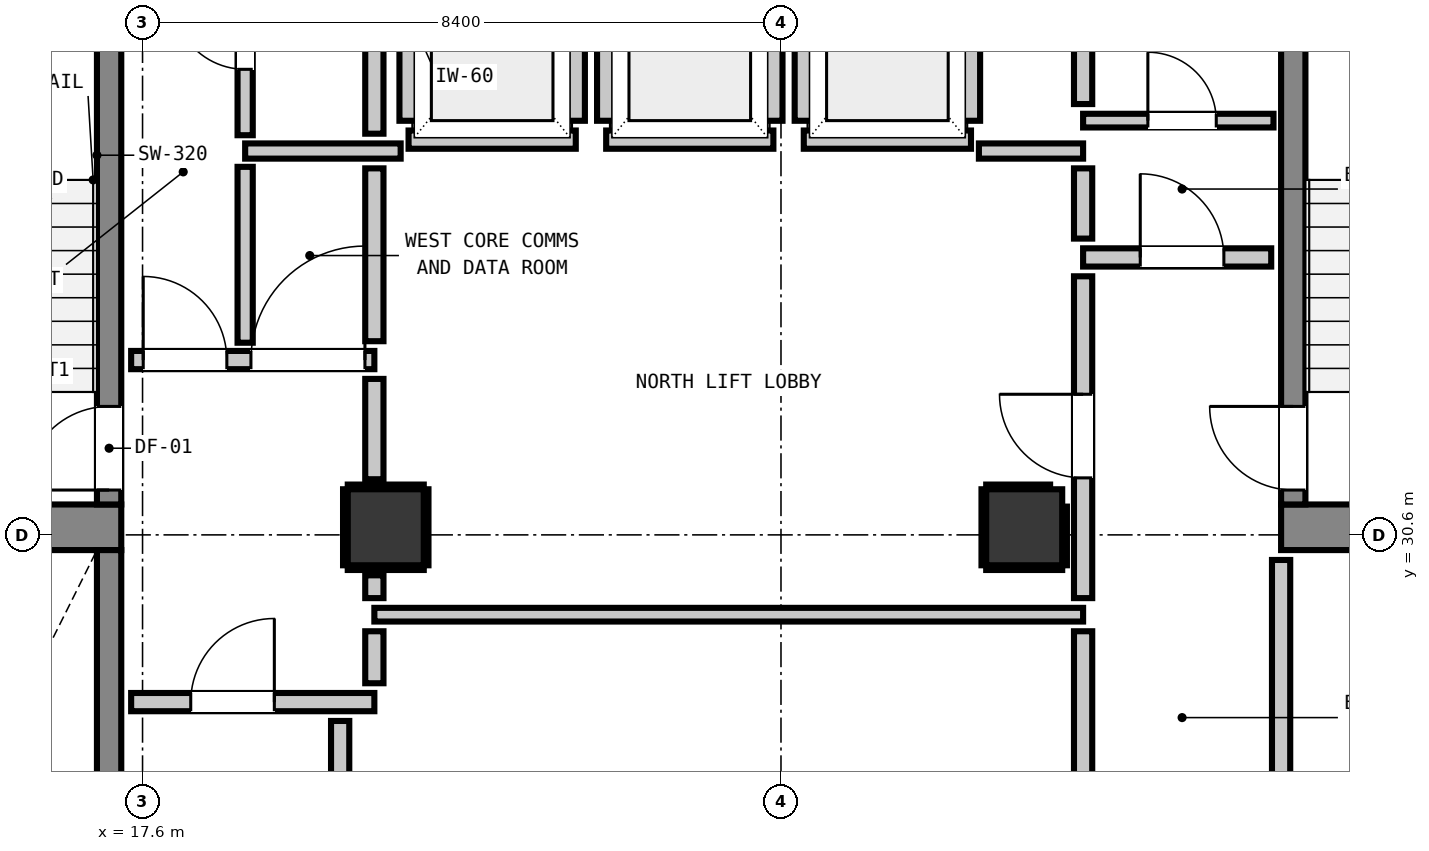
"""IFC4 building model, lengths in metres.
Left out: names, types, materials, properties, quantities, classifications, styles, units other than length and angle.
Written with IfcOpenShell. Run it as: python <this file> out.ifc"""

import sys

from ifc_helpers import new_model, si_unit, direction, frame, frame_2d, origin, origin_2d, place, context, subcontext, project, spatial, rectangle, extrude, element, fill, save


model = new_model("IFC4")
c1 = context("Model", 3, precision=1e-05, world=origin(), true_north=direction((0.0, 1.0)))
c2 = subcontext(c1, "Body", "Model", "MODEL_VIEW")
j1 = project(units=[si_unit("LENGTHUNIT", "METRE"), si_unit("PLANEANGLEUNIT", "RADIAN")], contexts=[c1])
p1 = place(None, origin())
s1 = spatial("IfcSite", under=j1, at=p1, CompositionType="ELEMENT")
p2 = place(p1, origin())
s2 = spatial("IfcBuilding", under=s1, at=p2, CompositionType="ELEMENT")
p3 = place(p2, frame((0.0, 0.0, 65.16)))
s3 = spatial("IfcBuildingStorey", under=s2, at=p3, CompositionType="ELEMENT", Elevation=65.16)
for number, where, z_axis, x_axis in (
    (1, (13.905, 30.7, 0.0), (0.0, 0.0, 1.0), (1.0, 0.0, 0.0)),
    (2, (32.58, 30.7, 0.0), (0.0, 0.0, 1.0), (1.0, 0.0, 0.0)),
):
    element("IfcWall", number, at=place(p3, frame(where, z_axis=z_axis, x_axis=x_axis)), inside=s3, PredefinedType="SHEAR", context=c2, shape_type="SweptSolid", body=[
        extrude(rectangle(XDim=3.415, YDim=0.6, at=frame_2d((1.708, 0.0))), origin(), (0.0, 0.0, 1.0), 3.32),
    ])
p4 = place(p3, frame((17.16, 31.0, 0.0), z_axis=(0.0, 0.0, 1.0), x_axis=(0.0, 1.0, 0.0)))
e3 = element("IfcWall", 3, at=p4, inside=s3, PredefinedType="SHEAR", context=c2, shape_type="SweptSolid", body=[
    extrude(rectangle(XDim=7.8, YDim=0.32, at=frame_2d((3.9, 0.0))), origin(), (0.0, 0.0, 1.0), 3.32),
])
p5 = place(p4, frame((0.19, 0.0, 0.0)))
e4 = element("IfcOpeningElement", 4, at=p5, cuts=e3, PredefinedType="OPENING", context=c2, shape_type="SweptSolid", body=[
    extrude(rectangle(XDim=1.1, YDim=2.15, at=frame_2d((0.55, 1.075))), frame((0.0, 0.17, 0.0), z_axis=(0.0, -1.0, 0.0), x_axis=(1.0, 0.0, 0.0)), (0.0, 0.0, 1.0), 0.34),
])
p6 = place(p3, frame((17.16, 22.6, 0.0), z_axis=(0.0, 0.0, 1.0), x_axis=(0.0, 1.0, 0.0)))
e5 = element("IfcWall", 5, at=p6, inside=s3, PredefinedType="SHEAR", context=c2, shape_type="SweptSolid", body=[
    extrude(rectangle(XDim=7.8, YDim=0.32, at=frame_2d((3.9, 0.0))), origin(), (0.0, 0.0, 1.0), 3.32),
])
p7 = place(p6, frame((0.19, 0.0, 0.0)))
e6 = element("IfcOpeningElement", 6, at=p7, cuts=e5, PredefinedType="OPENING", context=c2, shape_type="SweptSolid", body=[
    extrude(rectangle(XDim=1.1, YDim=2.15, at=frame_2d((0.55, 1.075))), frame((0.0, 0.17, 0.0), z_axis=(0.0, -1.0, 0.0), x_axis=(1.0, 0.0, 0.0)), (0.0, 0.0, 1.0), 0.34),
])
p8 = place(p3, frame((32.74, 31.0, 0.0), z_axis=(0.0, 0.0, 1.0), x_axis=(0.0, 1.0, 0.0)))
e7 = element("IfcWall", 7, at=p8, inside=s3, PredefinedType="SHEAR", context=c2, shape_type="SweptSolid", body=[
    extrude(rectangle(XDim=7.8, YDim=0.32, at=frame_2d((3.9, 0.0))), origin(), (0.0, 0.0, 1.0), 3.32),
])
p9 = place(p8, frame((0.19, 0.0, 0.0)))
e8 = element("IfcOpeningElement", 8, at=p9, cuts=e7, PredefinedType="OPENING", context=c2, shape_type="SweptSolid", body=[
    extrude(rectangle(XDim=1.1, YDim=2.15, at=frame_2d((0.55, 1.075))), frame((0.0, 0.17, 0.0), z_axis=(0.0, -1.0, 0.0), x_axis=(1.0, 0.0, 0.0)), (0.0, 0.0, 1.0), 0.34),
])
for number, where, z_axis, x_axis in (
    (9, (20.8, 30.7, 0.0), (0.0, 0.0, 1.0), (1.0, 0.0, 0.0)),
    (10, (29.2, 30.7, 0.0), (0.0, 0.0, 1.0), (1.0, 0.0, 0.0)),
):
    element("IfcColumn", number, at=place(p3, frame(where, z_axis=z_axis, x_axis=x_axis)), inside=s3, PredefinedType="COLUMN", context=c2, shape_type="SweptSolid", body=[
        extrude(rectangle(XDim=1.0, YDim=1.0, at=origin_2d()), origin(), (0.0, 0.0, 1.0), 3.32),
    ])
p10 = place(p3, frame((21.1, 35.8, 0.0), z_axis=(0.0, 0.0, 1.0), x_axis=(1.0, 0.0, 0.0)))
e11 = element("IfcWall", 11, at=p10, inside=s3, PredefinedType="PARTITIONING", context=c2, shape_type="SweptSolid", body=[
    extrude(rectangle(XDim=2.2, YDim=0.24, at=frame_2d((1.1, 0.0))), origin(), (0.0, 0.0, 1.0), 3.06),
])
p11 = place(p3, frame((21.1, 36.048, 0.0), z_axis=(0.0, 0.0, 1.0), x_axis=(0.0, 1.0, 0.0)))
e12 = element("IfcWall", 12, at=p11, inside=s3, PredefinedType="PARTITIONING", context=c2, shape_type="SweptSolid", body=[
    extrude(rectangle(XDim=2.104, YDim=0.24, at=frame_2d((1.052, 0.0))), origin(), (0.0, 0.0, 1.0), 2.295),
])
p12 = place(p3, frame((23.3, 36.048, 0.0), z_axis=(0.0, 0.0, 1.0), x_axis=(0.0, 1.0, 0.0)))
e13 = element("IfcWall", 13, at=p12, inside=s3, PredefinedType="PARTITIONING", context=c2, shape_type="SweptSolid", body=[
    extrude(rectangle(XDim=2.104, YDim=0.24, at=frame_2d((1.052, 0.0))), origin(), (0.0, 0.0, 1.0), 3.06),
])
p13 = place(p3, frame((23.7, 35.8, 0.0), z_axis=(0.0, 0.0, 1.0), x_axis=(1.0, 0.0, 0.0)))
e14 = element("IfcWall", 14, at=p13, inside=s3, PredefinedType="PARTITIONING", context=c2, shape_type="SweptSolid", body=[
    extrude(rectangle(XDim=2.2, YDim=0.24, at=frame_2d((1.1, 0.0))), origin(), (0.0, 0.0, 1.0), 3.06),
])
for number, where, z_axis, x_axis in (
    (15, (23.7, 36.048, 0.0), (0.0, 0.0, 1.0), (0.0, 1.0, 0.0)),
    (16, (25.9, 36.048, 0.0), (0.0, 0.0, 1.0), (0.0, 1.0, 0.0)),
):
    element("IfcWall", number, at=place(p3, frame(where, z_axis=z_axis, x_axis=x_axis)), inside=s3, PredefinedType="PARTITIONING", context=c2, shape_type="SweptSolid", body=[
        extrude(rectangle(XDim=2.104, YDim=0.24, at=frame_2d((1.052, 0.0))), origin(), (0.0, 0.0, 1.0), 3.06),
    ])
p14 = place(p3, frame((26.3, 35.8, 0.0), z_axis=(0.0, 0.0, 1.0), x_axis=(1.0, 0.0, 0.0)))
e17 = element("IfcWall", 17, at=p14, inside=s3, PredefinedType="PARTITIONING", context=c2, shape_type="SweptSolid", body=[
    extrude(rectangle(XDim=2.2, YDim=0.24, at=frame_2d((1.1, 0.0))), origin(), (0.0, 0.0, 1.0), 3.06),
])
for number, where, z_axis, x_axis in (
    (18, (26.3, 36.048, 0.0), (0.0, 0.0, 1.0), (0.0, 1.0, 0.0)),
    (19, (28.5, 36.048, 0.0), (0.0, 0.0, 1.0), (0.0, 1.0, 0.0)),
):
    element("IfcWall", number, at=place(p3, frame(where, z_axis=z_axis, x_axis=x_axis)), inside=s3, PredefinedType="PARTITIONING", context=c2, shape_type="SweptSolid", body=[
        extrude(rectangle(XDim=2.104, YDim=0.24, at=frame_2d((1.052, 0.0))), origin(), (0.0, 0.0, 1.0), 3.06),
    ])
p15 = place(p3, frame((17.45, 28.4, 0.0), z_axis=(0.0, 0.0, 1.0), x_axis=(1.0, 0.0, 0.0)))
e20 = element("IfcWall", 20, at=p15, inside=s3, PredefinedType="PARTITIONING", context=c2, shape_type="SweptSolid", body=[
    extrude(rectangle(XDim=3.2, YDim=0.24, at=frame_2d((1.6, 0.0))), origin(), (0.0, 0.0, 1.0), 3.06),
])
p16 = place(p15, frame((0.784, 0.0, 0.0)))
e21 = element("IfcOpeningElement", 21, at=p16, cuts=e20, PredefinedType="OPENING", context=c2, shape_type="SweptSolid", body=[
    extrude(rectangle(XDim=1.1, YDim=2.15, at=frame_2d((0.55, 1.075))), frame((0.0, 0.13, 0.0), z_axis=(0.0, -1.0, 0.0), x_axis=(1.0, 0.0, 0.0)), (0.0, 0.0, 1.0), 0.26),
])
p17 = place(p3, frame((17.45, 32.9, 0.0), z_axis=(0.0, 0.0, 1.0), x_axis=(1.0, 0.0, 0.0)))
e22 = element("IfcWall", 22, at=p17, inside=s3, PredefinedType="PARTITIONING", context=c2, shape_type="SweptSolid", body=[
    extrude(rectangle(XDim=3.2, YDim=0.24, at=frame_2d((1.6, 0.0))), origin(), (0.0, 0.0, 1.0), 3.06),
])
p18 = place(p17, frame((0.159, 0.0, 0.0)))
e23 = element("IfcOpeningElement", 23, at=p18, cuts=e22, PredefinedType="OPENING", context=c2, shape_type="SweptSolid", body=[
    extrude(rectangle(XDim=1.1, YDim=2.15, at=frame_2d((0.55, 1.075))), frame((0.0, 0.13, 0.0), z_axis=(0.0, -1.0, 0.0), x_axis=(1.0, 0.0, 0.0)), (0.0, 0.0, 1.0), 0.26),
])
p19 = place(p17, frame((1.576, 0.0, 0.0)))
e24 = element("IfcOpeningElement", 24, at=p19, cuts=e22, PredefinedType="OPENING", context=c2, shape_type="SweptSolid", body=[
    extrude(rectangle(XDim=1.5, YDim=2.15, at=frame_2d((0.75, 1.075))), frame((0.0, 0.13, 0.0), z_axis=(0.0, -1.0, 0.0), x_axis=(1.0, 0.0, 0.0)), (0.0, 0.0, 1.0), 0.26),
])
p20 = place(p3, frame((29.975, 34.25, 0.0), z_axis=(0.0, 0.0, 1.0), x_axis=(1.0, 0.0, 0.0)))
e25 = element("IfcWall", 25, at=p20, inside=s3, PredefinedType="PARTITIONING", context=c2, shape_type="SweptSolid", body=[
    extrude(rectangle(XDim=2.475, YDim=0.24, at=frame_2d((1.237, 0.0))), origin(), (0.0, 0.0, 1.0), 3.06),
])
p21 = place(p20, frame((0.752, 0.0, 0.0)))
e26 = element("IfcOpeningElement", 26, at=p21, cuts=e25, PredefinedType="OPENING", context=c2, shape_type="SweptSolid", body=[
    extrude(rectangle(XDim=1.1, YDim=2.15, at=frame_2d((0.55, 1.075))), frame((0.0, 0.13, 0.0), z_axis=(0.0, -1.0, 0.0), x_axis=(1.0, 0.0, 0.0)), (0.0, 0.0, 1.0), 0.26),
])
p22 = place(p3, frame((18.95, 35.65, 0.0), z_axis=(0.0, 0.0, 1.0), x_axis=(1.0, 0.0, 0.0)))
e27 = element("IfcWall", 27, at=p22, inside=s3, PredefinedType="PARTITIONING", context=c2, shape_type="SweptSolid", body=[
    extrude(rectangle(XDim=2.046, YDim=0.2, at=frame_2d((1.023, 0.0))), origin(), (0.0, 0.0, 1.0), 3.06),
])
p23 = place(p3, frame((28.604, 35.65, 0.0), z_axis=(0.0, 0.0, 1.0), x_axis=(1.0, 0.0, 0.0)))
e28 = element("IfcWall", 28, at=p23, inside=s3, PredefinedType="PARTITIONING", context=c2, shape_type="SweptSolid", body=[
    extrude(rectangle(XDim=1.371, YDim=0.2, at=frame_2d((0.686, 0.0))), origin(), (0.0, 0.0, 1.0), 3.06),
])
p24 = place(p3, frame((20.65, 29.55, 0.0), z_axis=(0.0, 0.0, 1.0), x_axis=(1.0, 0.0, 0.0)))
e29 = element("IfcWall", 29, at=p24, inside=s3, PredefinedType="PARTITIONING", context=c2, shape_type="SweptSolid", body=[
    extrude(rectangle(XDim=9.325, YDim=0.18, at=frame_2d((4.663, 0.0))), origin(), (0.0, 0.0, 1.0), 3.06),
])
p25 = place(p3, frame((29.975, 36.05, 0.0), z_axis=(0.0, 0.0, 1.0), x_axis=(1.0, 0.0, 0.0)))
e30 = element("IfcWall", 30, at=p25, inside=s3, PredefinedType="PARTITIONING", context=c2, shape_type="SweptSolid", body=[
    extrude(rectangle(XDim=2.505, YDim=0.18, at=frame_2d((1.252, 0.0))), origin(), (0.0, 0.0, 1.0), 3.06),
])
p26 = place(p25, frame((0.852, 0.0, 0.0)))
e31 = element("IfcOpeningElement", 31, at=p26, cuts=e30, PredefinedType="OPENING", context=c2, shape_type="SweptSolid", body=[
    extrude(rectangle(XDim=0.9, YDim=2.1, at=frame_2d((0.45, 1.05))), frame((0.0, 0.1, 0.0), z_axis=(0.0, -1.0, 0.0), x_axis=(1.0, 0.0, 0.0)), (0.0, 0.0, 1.0), 0.2),
])
p27 = place(p3, frame((20.2, 22.586, 0.0), z_axis=(0.0, 0.0, 1.0), x_axis=(0.0, 1.0, 0.0)))
e32 = element("IfcWall", 32, at=p27, inside=s3, PredefinedType="PARTITIONING", context=c2, shape_type="SweptSolid", body=[
    extrude(rectangle(XDim=5.566, YDim=0.24, at=frame_2d((2.783, 0.0))), origin(), (0.0, 0.0, 1.0), 3.06),
])
p28 = place(p3, frame((20.65, 28.648, 0.0), z_axis=(0.0, 0.0, 1.0), x_axis=(0.0, 1.0, 0.0)))
e33 = element("IfcWall", 33, at=p28, inside=s3, PredefinedType="PARTITIONING", context=c2, shape_type="SweptSolid", body=[
    extrude(rectangle(XDim=0.684, YDim=0.24, at=frame_2d((0.342, 0.0))), origin(), (0.0, 0.0, 1.0), 2.295),
])
p29 = place(p3, frame((20.65, 29.768, 0.0), z_axis=(0.0, 0.0, 1.0), x_axis=(0.0, 1.0, 0.0)))
e34 = element("IfcWall", 34, at=p29, inside=s3, PredefinedType="PARTITIONING", context=c2, shape_type="SweptSolid", body=[
    extrude(rectangle(XDim=0.3, YDim=0.24, at=frame_2d((0.15, 0.0))), origin(), (0.0, 0.0, 1.0), 2.295),
])
p30 = place(p3, frame((20.65, 31.332, 0.0), z_axis=(0.0, 0.0, 1.0), x_axis=(0.0, 1.0, 0.0)))
e35 = element("IfcWall", 35, at=p30, inside=s3, PredefinedType="PARTITIONING", context=c2, shape_type="SweptSolid", body=[
    extrude(rectangle(XDim=1.32, YDim=0.24, at=frame_2d((0.66, 0.0))), origin(), (0.0, 0.0, 1.0), 2.295),
])
p31 = place(p3, frame((20.65, 33.148, 0.0), z_axis=(0.0, 0.0, 1.0), x_axis=(0.0, 1.0, 0.0)))
e36 = element("IfcWall", 36, at=p31, inside=s3, PredefinedType="PARTITIONING", context=c2, shape_type="SweptSolid", body=[
    extrude(rectangle(XDim=2.274, YDim=0.24, at=frame_2d((1.137, 0.0))), origin(), (0.0, 0.0, 1.0), 2.295),
])
p32 = place(p3, frame((20.65, 35.878, 0.0), z_axis=(0.0, 0.0, 1.0), x_axis=(0.0, 1.0, 0.0)))
e37 = element("IfcWall", 37, at=p32, inside=s3, PredefinedType="PARTITIONING", context=c2, shape_type="SweptSolid", body=[
    extrude(rectangle(XDim=2.674, YDim=0.24, at=frame_2d((1.337, 0.0))), origin(), (0.0, 0.0, 1.0), 2.295),
])
p33 = place(p3, frame((29.975, 25.648, 0.0), z_axis=(0.0, 0.0, 1.0), x_axis=(0.0, 1.0, 0.0)))
e38 = element("IfcWall", 38, at=p33, inside=s3, PredefinedType="PARTITIONING", context=c2, shape_type="SweptSolid", body=[
    extrude(rectangle(XDim=3.684, YDim=0.24, at=frame_2d((1.842, 0.0))), origin(), (0.0, 0.0, 1.0), 3.06),
])
p34 = place(p3, frame((29.975, 29.768, 0.0), z_axis=(0.0, 0.0, 1.0), x_axis=(0.0, 1.0, 0.0)))
e39 = element("IfcWall", 39, at=p34, inside=s3, PredefinedType="PARTITIONING", context=c2, shape_type="SweptSolid", body=[
    extrude(rectangle(XDim=4.234, YDim=0.24, at=frame_2d((2.117, 0.0))), origin(), (0.0, 0.0, 1.0), 3.06),
])
p35 = place(p34, frame((1.582, 0.0, 0.0)))
e40 = element("IfcOpeningElement", 40, at=p35, cuts=e39, PredefinedType="OPENING", context=c2, shape_type="SweptSolid", body=[
    extrude(rectangle(XDim=1.1, YDim=2.15, at=frame_2d((0.55, 1.075))), frame((0.0, 0.13, 0.0), z_axis=(0.0, -1.0, 0.0), x_axis=(1.0, 0.0, 0.0)), (0.0, 0.0, 1.0), 0.26),
])
p36 = place(p3, frame((29.975, 34.498, 0.0), z_axis=(0.0, 0.0, 1.0), x_axis=(0.0, 1.0, 0.0)))
e41 = element("IfcWall", 41, at=p36, inside=s3, PredefinedType="PARTITIONING", context=c2, shape_type="SweptSolid", body=[
    extrude(rectangle(XDim=0.924, YDim=0.24, at=frame_2d((0.462, 0.0))), origin(), (0.0, 0.0, 1.0), 3.06),
])
p37 = place(p3, frame((29.975, 36.268, 0.0), z_axis=(0.0, 0.0, 1.0), x_axis=(0.0, 1.0, 0.0)))
e42 = element("IfcWall", 42, at=p37, inside=s3, PredefinedType="PARTITIONING", context=c2, shape_type="SweptSolid", body=[
    extrude(rectangle(XDim=2.284, YDim=0.24, at=frame_2d((1.142, 0.0))), origin(), (0.0, 0.0, 1.0), 3.06),
])
p38 = place(p3, frame((32.58, 25.648, 0.0), z_axis=(0.0, 0.0, 1.0), x_axis=(0.0, 1.0, 0.0)))
e43 = element("IfcWall", 43, at=p38, inside=s3, PredefinedType="PARTITIONING", context=c2, shape_type="SweptSolid", body=[
    extrude(rectangle(XDim=4.622, YDim=0.24, at=frame_2d((2.311, 0.0))), origin(), (0.0, 0.0, 1.0), 3.06),
])
p39 = place(p3, frame((18.95, 33.128, 0.0), z_axis=(0.0, 0.0, 1.0), x_axis=(0.0, 1.0, 0.0)))
e44 = element("IfcWall", 44, at=p39, inside=s3, PredefinedType="PARTITIONING", context=c2, shape_type="SweptSolid", body=[
    extrude(rectangle(XDim=2.314, YDim=0.2, at=frame_2d((1.157, 0.0))), origin(), (0.0, 0.0, 1.0), 3.06),
])
p40 = place(p3, frame((18.95, 35.858, 0.0), z_axis=(0.0, 0.0, 1.0), x_axis=(0.0, 1.0, 0.0)))
e45 = element("IfcWall", 45, at=p40, inside=s3, PredefinedType="PARTITIONING", context=c2, shape_type="SweptSolid", body=[
    extrude(rectangle(XDim=2.714, YDim=0.2, at=frame_2d((1.357, 0.0))), origin(), (0.0, 0.0, 1.0), 3.06),
])
p41 = place(p40, frame((0.867, 0.0, 0.0)))
e46 = element("IfcOpeningElement", 46, at=p41, cuts=e45, PredefinedType="OPENING", context=c2, shape_type="SweptSolid", body=[
    extrude(rectangle(XDim=0.95, YDim=2.1, at=frame_2d((0.475, 1.05))), frame((0.0, 0.11, 0.0), z_axis=(0.0, -1.0, 0.0), x_axis=(1.0, 0.0, 0.0)), (0.0, 0.0, 1.0), 0.22),
])
for number, where, z_axis, x_axis in (
    (47, (20.3, 30.168, 0.0), (0.0, 0.0, 1.0), (1.0, 0.0, 0.0)),
    (48, (20.3, 31.232, 0.0), (0.0, 0.0, 1.0), (1.0, 0.0, 0.0)),
    (49, (20.268, 30.2, 0.0), (0.0, 0.0, 1.0), (0.0, 1.0, 0.0)),
    (50, (21.332, 30.2, 0.0), (0.0, 0.0, 1.0), (0.0, 1.0, 0.0)),
    (51, (28.7, 30.168, 0.0), (0.0, 0.0, 1.0), (1.0, 0.0, 0.0)),
):
    element("IfcWall", number, at=place(p3, frame(where, z_axis=z_axis, x_axis=x_axis)), inside=s3, PredefinedType="PARTITIONING", context=c2, shape_type="SweptSolid", body=[
        extrude(rectangle(XDim=1.0, YDim=0.06, at=frame_2d((0.5, 0.0))), origin(), (0.0, 0.0, 1.0), 1.45),
    ])
p42 = place(p3, frame((28.7, 31.232, 0.0), z_axis=(0.0, 0.0, 1.0), x_axis=(1.0, 0.0, 0.0)))
e52 = element("IfcWall", 52, at=p42, inside=s3, PredefinedType="PARTITIONING", context=c2, shape_type="SweptSolid", body=[
    extrude(rectangle(XDim=0.841, YDim=0.06, at=frame_2d((0.42, 0.0))), origin(), (0.0, 0.0, 1.0), 1.45),
])
p43 = place(p3, frame((28.668, 30.2, 0.0), z_axis=(0.0, 0.0, 1.0), x_axis=(0.0, 1.0, 0.0)))
e53 = element("IfcWall", 53, at=p43, inside=s3, PredefinedType="PARTITIONING", context=c2, shape_type="SweptSolid", body=[
    extrude(rectangle(XDim=1.0, YDim=0.06, at=frame_2d((0.5, 0.0))), origin(), (0.0, 0.0, 1.0), 1.45),
])
p44 = place(p3, frame((29.732, 30.2, 0.0), z_axis=(0.0, 0.0, 1.0), x_axis=(0.0, 1.0, 0.0)))
e54 = element("IfcWall", 54, at=p44, inside=s3, PredefinedType="PARTITIONING", context=c2, shape_type="SweptSolid", body=[
    extrude(rectangle(XDim=0.772, YDim=0.06, at=frame_2d((0.386, 0.0))), origin(), (0.0, 0.0, 1.0), 1.45),
])
p45 = place(p5, origin())
e55 = element("IfcDoor", 55, at=p45, inside=s3, OperationType="SINGLE_SWING_LEFT", PredefinedType="DOOR", context=c2, shape_type="SweptSolid", body=[
    extrude(rectangle(XDim=1.1, YDim=2.15, at=frame_2d((0.55, 1.075))), frame((0.0, 0.025, 0.0), z_axis=(0.0, -1.0, 0.0), x_axis=(1.0, 0.0, 0.0)), (0.0, 0.0, 1.0), 0.05),
])
fill(e4, e55)
p46 = place(p9, origin())
e56 = element("IfcDoor", 56, at=p46, inside=s3, OperationType="SINGLE_SWING_RIGHT", PredefinedType="DOOR", context=c2, shape_type="SweptSolid", body=[
    extrude(rectangle(XDim=1.1, YDim=2.15, at=frame_2d((0.55, 1.075))), frame((0.0, 0.025, 0.0), z_axis=(0.0, -1.0, 0.0), x_axis=(1.0, 0.0, 0.0)), (0.0, 0.0, 1.0), 0.05),
])
fill(e8, e56)
p47 = place(p16, origin())
e57 = element("IfcDoor", 57, at=p47, inside=s3, OperationType="SINGLE_SWING_RIGHT", PredefinedType="DOOR", context=c2, shape_type="SweptSolid", body=[
    extrude(rectangle(XDim=1.1, YDim=2.15, at=frame_2d((0.55, 1.075))), frame((0.0, 0.025, 0.0), z_axis=(0.0, -1.0, 0.0), x_axis=(1.0, 0.0, 0.0)), (0.0, 0.0, 1.0), 0.05),
])
fill(e21, e57)
p48 = place(p18, origin())
e58 = element("IfcDoor", 58, at=p48, inside=s3, OperationType="SINGLE_SWING_LEFT", PredefinedType="DOOR", context=c2, shape_type="SweptSolid", body=[
    extrude(rectangle(XDim=1.1, YDim=2.15, at=frame_2d((0.55, 1.075))), frame((0.0, 0.025, 0.0), z_axis=(0.0, -1.0, 0.0), x_axis=(1.0, 0.0, 0.0)), (0.0, 0.0, 1.0), 0.05),
])
fill(e23, e58)
p49 = place(p35, origin())
e59 = element("IfcDoor", 59, at=p49, inside=s3, OperationType="SINGLE_SWING_RIGHT", PredefinedType="DOOR", context=c2, shape_type="SweptSolid", body=[
    extrude(rectangle(XDim=1.1, YDim=2.15, at=frame_2d((0.55, 1.075))), frame((0.0, 0.025, 0.0), z_axis=(0.0, -1.0, 0.0), x_axis=(1.0, 0.0, 0.0)), (0.0, 0.0, 1.0), 0.05),
])
fill(e40, e59)
p50 = place(p21, origin())
e60 = element("IfcDoor", 60, at=p50, inside=s3, OperationType="SINGLE_SWING_LEFT", PredefinedType="DOOR", context=c2, shape_type="SweptSolid", body=[
    extrude(rectangle(XDim=1.1, YDim=2.15, at=frame_2d((0.55, 1.075))), frame((0.0, 0.025, 0.0), z_axis=(0.0, -1.0, 0.0), x_axis=(1.0, 0.0, 0.0)), (0.0, 0.0, 1.0), 0.05),
])
fill(e26, e60)
p51 = place(p19, origin())
e61 = element("IfcDoor", 61, at=p51, inside=s3, OperationType="SINGLE_SWING_RIGHT", PredefinedType="DOOR", context=c2, shape_type="SweptSolid", body=[
    extrude(rectangle(XDim=1.5, YDim=2.15, at=frame_2d((0.75, 1.075))), frame((0.0, 0.025, 0.0), z_axis=(0.0, -1.0, 0.0), x_axis=(1.0, 0.0, 0.0)), (0.0, 0.0, 1.0), 0.05),
])
fill(e24, e61)
p52 = place(p26, origin())
e62 = element("IfcDoor", 62, at=p52, inside=s3, OperationType="SINGLE_SWING_LEFT", PredefinedType="DOOR", context=c2, shape_type="SweptSolid", body=[
    extrude(rectangle(XDim=0.9, YDim=2.1, at=frame_2d((0.45, 1.05))), frame((0.0, 0.025, 0.0), z_axis=(0.0, -1.0, 0.0), x_axis=(1.0, 0.0, 0.0)), (0.0, 0.0, 1.0), 0.05),
])
fill(e31, e62)
p53 = place(p41, origin())
e63 = element("IfcDoor", 63, at=p53, inside=s3, OperationType="SINGLE_SWING_RIGHT", PredefinedType="DOOR", context=c2, shape_type="SweptSolid", body=[
    extrude(rectangle(XDim=0.95, YDim=2.1, at=frame_2d((0.475, 1.05))), frame((0.0, 0.025, 0.0), z_axis=(0.0, -1.0, 0.0), x_axis=(1.0, 0.0, 0.0)), (0.0, 0.0, 1.0), 0.05),
])
fill(e46, e63)
save(model, sys.argv[1])
